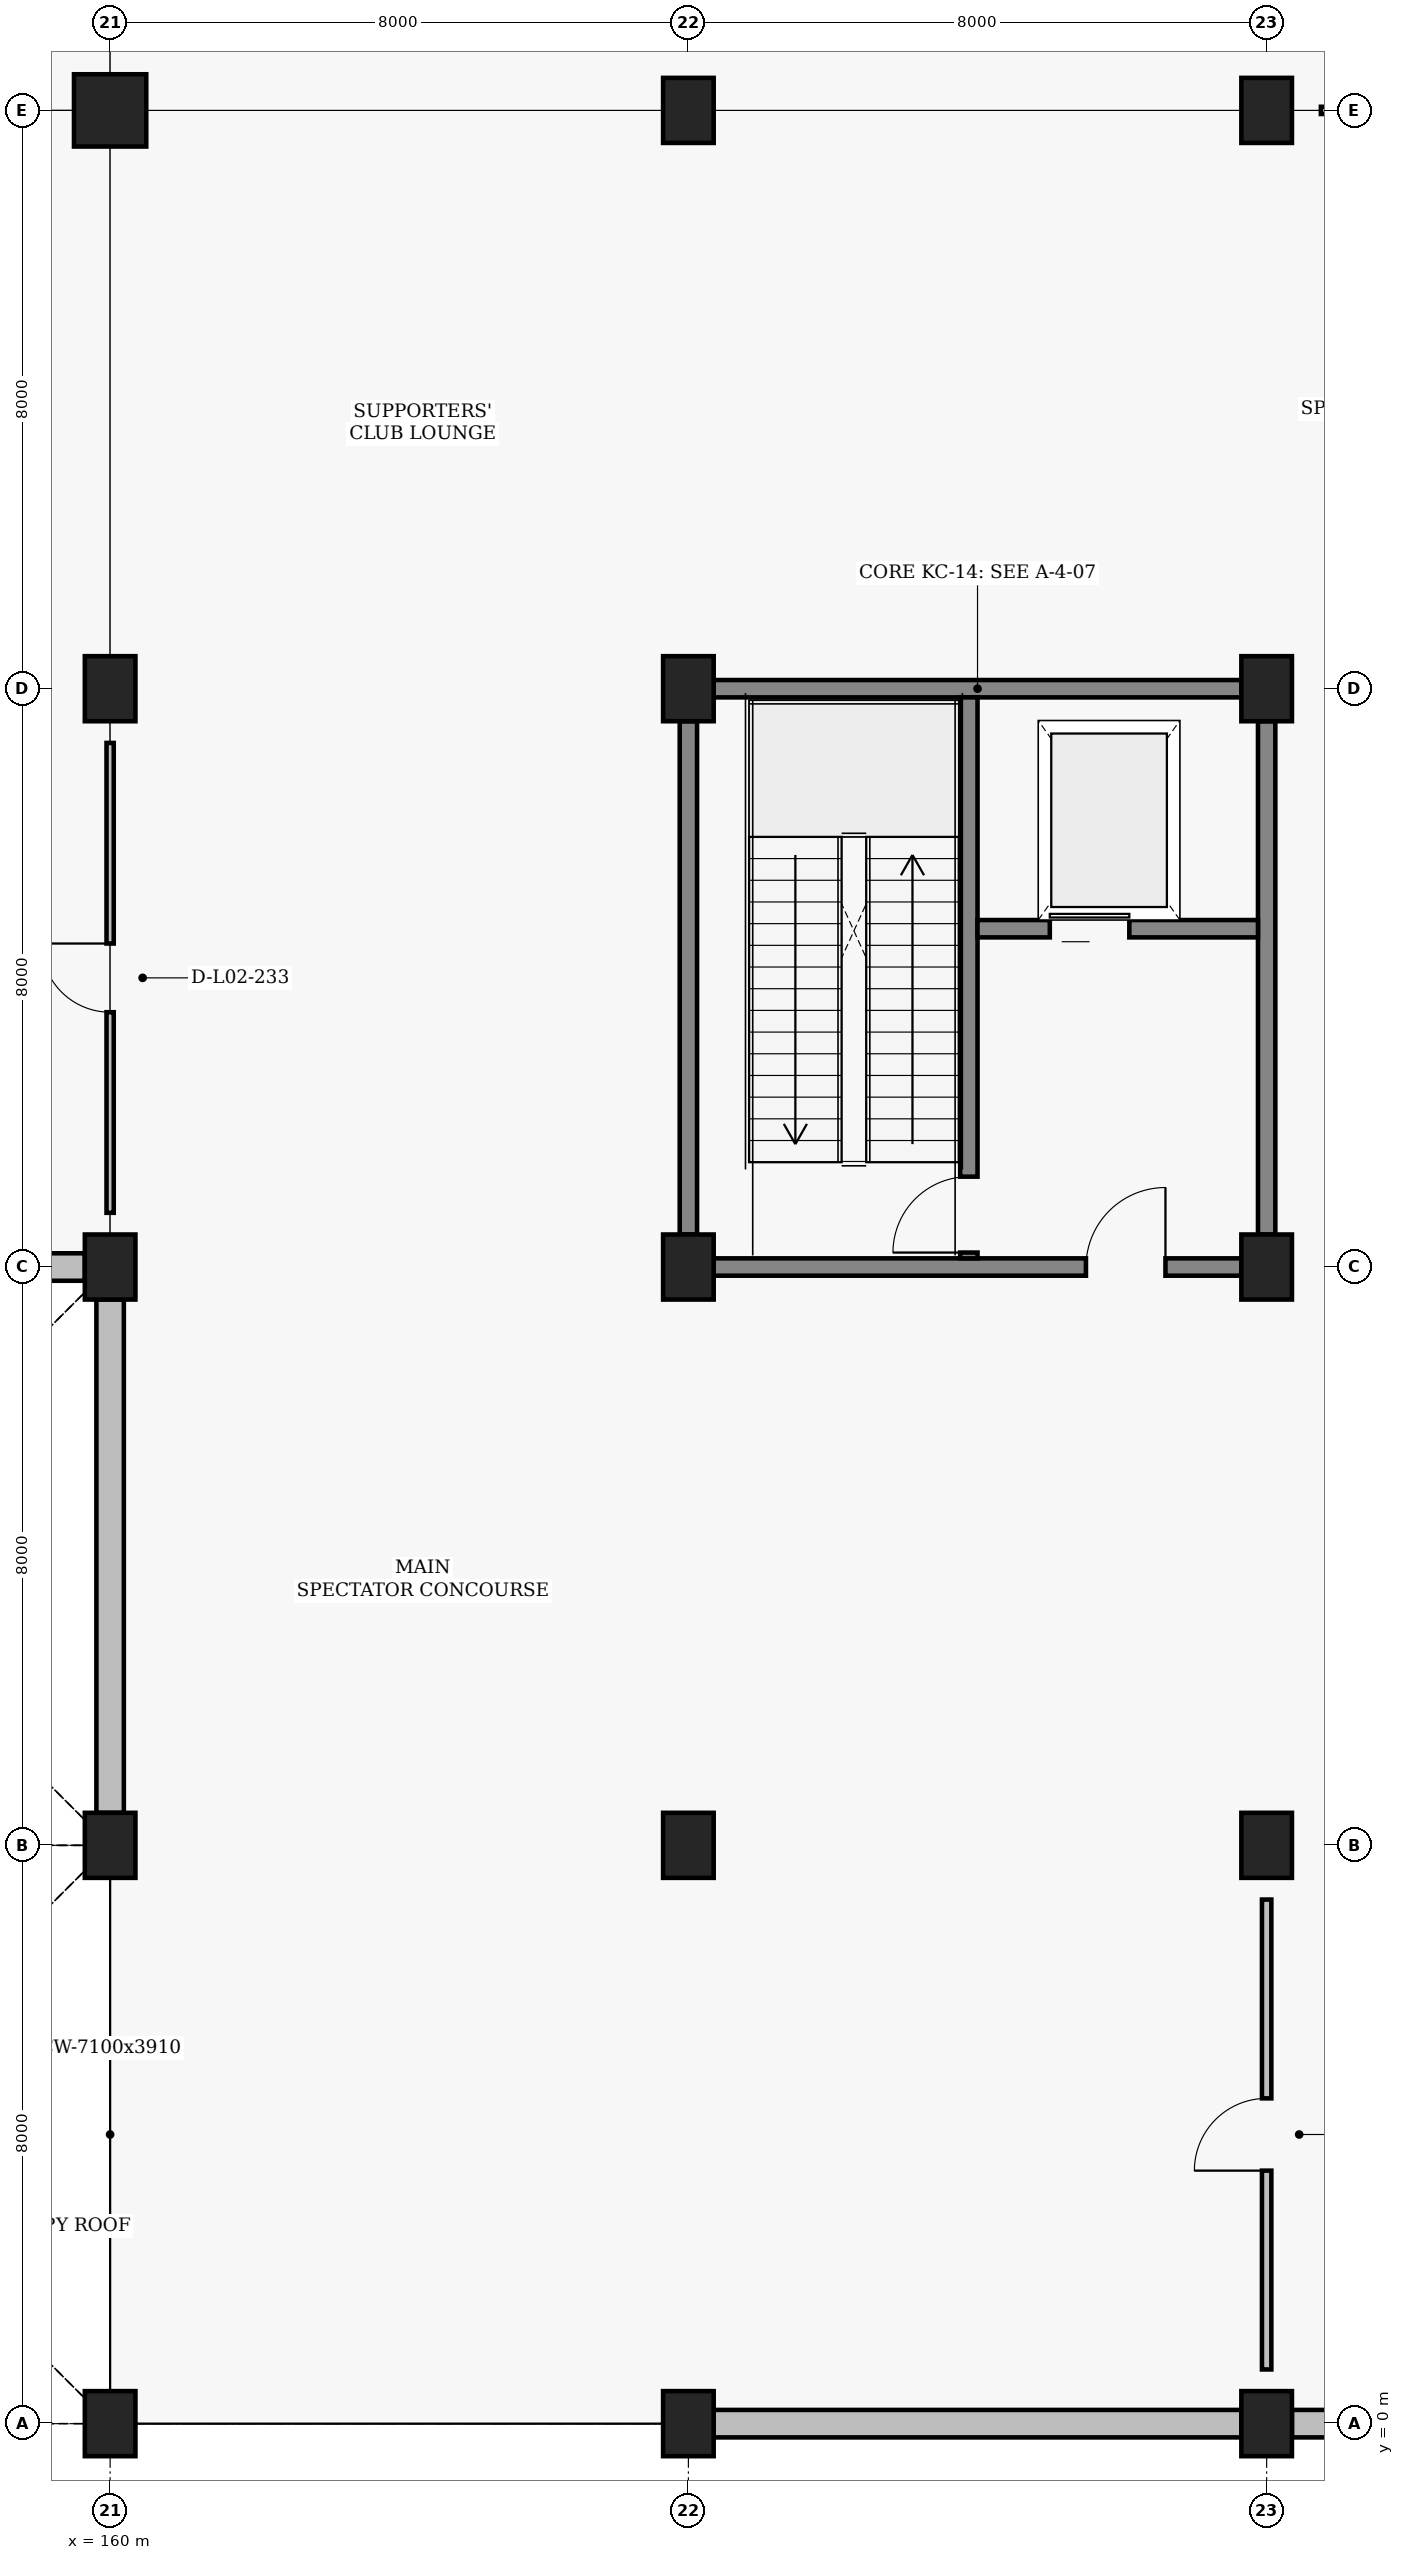
"""IFC4 building model, lengths in metres.
Left out: names, types, materials, properties, quantities, classifications, styles, units other than length and angle.
Written with IfcOpenShell. Run it as: python <this file> out.ifc"""

import sys

from ifc_helpers import new_model, si_unit, direction, frame, frame_2d, origin, origin_2d, place, context, subcontext, project, spatial, rectangle, extrude, element, fill, save


model = new_model("IFC4")
c1 = context("Model", 3, precision=1e-05, world=origin(), true_north=direction((0.0, 1.0)))
c2 = subcontext(c1, "Body", "Model", "MODEL_VIEW")
j1 = project(units=[si_unit("LENGTHUNIT", "METRE"), si_unit("PLANEANGLEUNIT", "RADIAN")], contexts=[c1])
p1 = place(None, origin())
s1 = spatial("IfcSite", under=j1, at=p1, CompositionType="ELEMENT")
p2 = place(p1, origin())
s2 = spatial("IfcBuilding", under=s1, at=p2, CompositionType="ELEMENT")
p3 = place(p2, frame((0.0, 0.0, 4.8)))
s3 = spatial("IfcBuildingStorey", under=s2, at=p3, CompositionType="ELEMENT", Elevation=4.8)
for number, where, z_axis, x_axis in (
    (1, (160.0, 0.0, 0.0), (0.0, 0.0, 1.0), (1.0, 0.0, 0.0)),
    (2, (160.0, 8.0, 0.0), (0.0, 0.0, 1.0), (1.0, 0.0, 0.0)),
    (3, (160.0, 16.0, 0.0), (0.0, 0.0, 1.0), (1.0, 0.0, 0.0)),
    (4, (160.0, 24.0, 0.0), (0.0, 0.0, 1.0), (1.0, 0.0, 0.0)),
):
    element("IfcColumn", number, at=place(p3, frame(where, z_axis=z_axis, x_axis=x_axis)), inside=s3, PredefinedType="COLUMN", context=c2, shape_type="SweptSolid", body=[
        extrude(rectangle(XDim=0.7, YDim=0.9, at=origin_2d()), origin(), (0.0, 0.0, 1.0), 4.8),
    ])
p4 = place(p3, frame((160.0, 32.0, 0.0), z_axis=(0.0, 0.0, 1.0), x_axis=(1.0, 0.0, 0.0)))
e5 = element("IfcColumn", 5, at=p4, inside=s3, PredefinedType="COLUMN", context=c2, shape_type="SweptSolid", body=[
    extrude(rectangle(XDim=1.0, YDim=1.0, at=origin_2d()), origin(), (0.0, 0.0, 1.0), 4.8),
])
for number, where, z_axis, x_axis in (
    (6, (168.0, 0.0, 0.0), (0.0, 0.0, 1.0), (1.0, 0.0, 0.0)),
    (7, (168.0, 8.0, 0.0), (0.0, 0.0, 1.0), (1.0, 0.0, 0.0)),
    (8, (168.0, 16.0, 0.0), (0.0, 0.0, 1.0), (1.0, 0.0, 0.0)),
    (9, (168.0, 24.0, 0.0), (0.0, 0.0, 1.0), (1.0, 0.0, 0.0)),
    (10, (168.0, 32.0, 0.0), (0.0, 0.0, 1.0), (1.0, 0.0, 0.0)),
    (11, (176.0, 0.0, 0.0), (0.0, 0.0, 1.0), (1.0, 0.0, 0.0)),
    (12, (176.0, 8.0, 0.0), (0.0, 0.0, 1.0), (1.0, 0.0, 0.0)),
    (13, (176.0, 16.0, 0.0), (0.0, 0.0, 1.0), (1.0, 0.0, 0.0)),
    (14, (176.0, 24.0, 0.0), (0.0, 0.0, 1.0), (1.0, 0.0, 0.0)),
    (15, (176.0, 32.0, 0.0), (0.0, 0.0, 1.0), (1.0, 0.0, 0.0)),
):
    element("IfcColumn", number, at=place(p3, frame(where, z_axis=z_axis, x_axis=x_axis)), inside=s3, PredefinedType="COLUMN", context=c2, shape_type="SweptSolid", body=[
        extrude(rectangle(XDim=0.7, YDim=0.9, at=origin_2d()), origin(), (0.0, 0.0, 1.0), 4.8),
    ])
p5 = place(p3, frame((152.35, 16.0, 0.0), z_axis=(0.0, 0.0, 1.0), x_axis=(1.0, 0.0, 0.0)))
e16 = element("IfcWall", 16, at=p5, inside=s3, PredefinedType="SOLIDWALL", context=c2, shape_type="SweptSolid", body=[
    extrude(rectangle(XDim=7.3, YDim=0.38, at=frame_2d((3.65, 0.0))), origin(), (0.0, 0.0, 1.0), 3.91),
])
p6 = place(p3, frame((160.0, 8.45, 0.0), z_axis=(0.0, 0.0, 1.0), x_axis=(0.0, 1.0, 0.0)))
e17 = element("IfcWall", 17, at=p6, inside=s3, PredefinedType="SOLIDWALL", context=c2, shape_type="SweptSolid", body=[
    extrude(rectangle(XDim=7.1, YDim=0.38, at=frame_2d((3.55, 0.0))), origin(), (0.0, 0.0, 1.0), 3.91),
])
p7 = place(p3, frame((168.35, 0.0, 0.0), z_axis=(0.0, 0.0, 1.0), x_axis=(1.0, 0.0, 0.0)))
e18 = element("IfcWall", 18, at=p7, inside=s3, PredefinedType="SOLIDWALL", context=c2, shape_type="SweptSolid", body=[
    extrude(rectangle(XDim=7.3, YDim=0.38, at=frame_2d((3.65, 0.0))), origin(), (0.0, 0.0, 1.0), 3.91),
])
p8 = place(p3, frame((176.35, 0.0, 0.0), z_axis=(0.0, 0.0, 1.0), x_axis=(1.0, 0.0, 0.0)))
e19 = element("IfcWall", 19, at=p8, inside=s3, PredefinedType="SOLIDWALL", context=c2, shape_type="SweptSolid", body=[
    extrude(rectangle(XDim=7.3, YDim=0.38, at=frame_2d((3.65, 0.0))), origin(), (0.0, 0.0, 1.0), 3.91),
])
p9 = place(p8, frame((2.45, 0.0, 0.95)))
e20 = element("IfcOpeningElement", 20, at=p9, cuts=e19, PredefinedType="OPENING", context=c2, shape_type="SweptSolid", body=[
    extrude(rectangle(XDim=2.4, YDim=2.0, at=frame_2d((1.2, 1.0))), frame((0.0, 0.2, 0.0), z_axis=(0.0, -1.0, 0.0), x_axis=(1.0, 0.0, 0.0)), (0.0, 0.0, 1.0), 0.4),
])
p10 = place(p3, frame((168.35, 16.0, 0.0), z_axis=(0.0, 0.0, 1.0), x_axis=(1.0, 0.0, 0.0)))
e21 = element("IfcWall", 21, at=p10, inside=s3, PredefinedType="SHEAR", context=c2, shape_type="SweptSolid", body=[
    extrude(rectangle(XDim=7.3, YDim=0.24, at=frame_2d((3.65, 0.0))), origin(), (0.0, 0.0, 1.0), 3.61),
])
p11 = place(p10, frame((5.15, 0.0, 0.0)))
e22 = element("IfcOpeningElement", 22, at=p11, cuts=e21, PredefinedType="OPENING", context=c2, shape_type="SweptSolid", body=[
    extrude(rectangle(XDim=1.1, YDim=2.2, at=frame_2d((0.55, 1.1))), frame((0.0, 0.13, 0.0), z_axis=(0.0, -1.0, 0.0), x_axis=(1.0, 0.0, 0.0)), (0.0, 0.0, 1.0), 0.26),
])
p12 = place(p3, frame((168.35, 24.0, 0.0), z_axis=(0.0, 0.0, 1.0), x_axis=(1.0, 0.0, 0.0)))
e23 = element("IfcWall", 23, at=p12, inside=s3, PredefinedType="SHEAR", context=c2, shape_type="SweptSolid", body=[
    extrude(rectangle(XDim=7.3, YDim=0.24, at=frame_2d((3.65, 0.0))), origin(), (0.0, 0.0, 1.0), 3.91),
])
p13 = place(p3, frame((168.0, 16.45, 0.0), z_axis=(0.0, 0.0, 1.0), x_axis=(0.0, 1.0, 0.0)))
e24 = element("IfcWall", 24, at=p13, inside=s3, PredefinedType="SHEAR", context=c2, shape_type="SweptSolid", body=[
    extrude(rectangle(XDim=7.1, YDim=0.24, at=frame_2d((3.55, 0.0))), origin(), (0.0, 0.0, 1.0), 3.91),
])
p14 = place(p3, frame((176.0, 16.45, 0.0), z_axis=(0.0, 0.0, 1.0), x_axis=(0.0, 1.0, 0.0)))
e25 = element("IfcWall", 25, at=p14, inside=s3, PredefinedType="SHEAR", context=c2, shape_type="SweptSolid", body=[
    extrude(rectangle(XDim=7.1, YDim=0.24, at=frame_2d((3.55, 0.0))), origin(), (0.0, 0.0, 1.0), 3.61),
])
p15 = place(p3, frame((171.88, 16.12, 0.0), z_axis=(0.0, 0.0, 1.0), x_axis=(0.0, 1.0, 0.0)))
e26 = element("IfcWall", 26, at=p15, inside=s3, PredefinedType="SHEAR", context=c2, shape_type="SweptSolid", body=[
    extrude(rectangle(XDim=7.76, YDim=0.24, at=frame_2d((3.88, 0.0))), origin(), (0.0, 0.0, 1.0), 4.01),
])
p16 = place(p15, frame((0.08, 0.0, 0.0)))
e27 = element("IfcOpeningElement", 27, at=p16, cuts=e26, PredefinedType="OPENING", context=c2, shape_type="SweptSolid", body=[
    extrude(rectangle(XDim=1.05, YDim=2.15, at=frame_2d((0.525, 1.075))), frame((0.0, 0.13, 0.0), z_axis=(0.0, -1.0, 0.0), x_axis=(1.0, 0.0, 0.0)), (0.0, 0.0, 1.0), 0.26),
])
p17 = place(p3, frame((172.0, 20.68, 0.0), z_axis=(0.0, 0.0, 1.0), x_axis=(1.0, 0.0, 0.0)))
e28 = element("IfcWall", 28, at=p17, inside=s3, PredefinedType="SHEAR", context=c2, shape_type="SweptSolid", body=[
    extrude(rectangle(XDim=3.88, YDim=0.24, at=frame_2d((1.94, 0.0))), origin(), (0.0, 0.0, 1.0), 3.91),
])
p18 = place(p17, frame((1.0, 0.0, 0.0)))
e29 = element("IfcOpeningElement", 29, at=p18, cuts=e28, PredefinedType="OPENING", context=c2, shape_type="SweptSolid", body=[
    extrude(rectangle(XDim=1.1, YDim=2.15, at=frame_2d((0.55, 1.075))), frame((0.0, 0.13, 0.0), z_axis=(0.0, -1.0, 0.0), x_axis=(1.0, 0.0, 0.0)), (0.0, 0.0, 1.0), 0.26),
])
p19 = place(p3, frame((160.0, 16.75, 0.0), z_axis=(0.0, 0.0, 1.0), x_axis=(0.0, 1.0, 0.0)))
e30 = element("IfcWall", 30, at=p19, inside=s3, PredefinedType="PARTITIONING", context=c2, shape_type="SweptSolid", body=[
    extrude(rectangle(XDim=6.5, YDim=0.1, at=frame_2d((3.25, 0.0))), origin(), (0.0, 0.0, 1.0), 3.91),
])
p20 = place(p19, frame((2.775, 0.0, 0.0)))
e31 = element("IfcOpeningElement", 31, at=p20, cuts=e30, PredefinedType="OPENING", context=c2, shape_type="SweptSolid", body=[
    extrude(rectangle(XDim=0.95, YDim=2.1, at=frame_2d((0.475, 1.05))), frame((0.0, 0.06, 0.0), z_axis=(0.0, -1.0, 0.0), x_axis=(1.0, 0.0, 0.0)), (0.0, 0.0, 1.0), 0.12),
])
p21 = place(p3, frame((176.0, 0.75, 0.0), z_axis=(0.0, 0.0, 1.0), x_axis=(0.0, 1.0, 0.0)))
e32 = element("IfcWall", 32, at=p21, inside=s3, PredefinedType="PARTITIONING", context=c2, shape_type="SweptSolid", body=[
    extrude(rectangle(XDim=6.5, YDim=0.13, at=frame_2d((3.25, 0.0))), origin(), (0.0, 0.0, 1.0), 3.91),
])
p22 = place(p21, frame((2.75, 0.0, 0.0)))
e33 = element("IfcOpeningElement", 33, at=p22, cuts=e32, PredefinedType="OPENING", context=c2, shape_type="SweptSolid", body=[
    extrude(rectangle(XDim=1.0, YDim=2.1, at=frame_2d((0.5, 1.05))), frame((0.0, 0.075, 0.0), z_axis=(0.0, -1.0, 0.0), x_axis=(1.0, 0.0, 0.0)), (0.0, 0.0, 1.0), 0.15),
])
p23 = place(p3, frame((176.75, 32.0, 0.0), z_axis=(0.0, 0.0, 1.0), x_axis=(1.0, 0.0, 0.0)))
e34 = element("IfcWall", 34, at=p23, inside=s3, PredefinedType="PARTITIONING", context=c2, shape_type="SweptSolid", body=[
    extrude(rectangle(XDim=6.5, YDim=0.1, at=frame_2d((3.25, 0.0))), origin(), (0.0, 0.0, 1.0), 3.91),
])
p24 = place(p23, frame((2.775, 0.0, 0.0)))
e35 = element("IfcOpeningElement", 35, at=p24, cuts=e34, PredefinedType="OPENING", context=c2, shape_type="SweptSolid", body=[
    extrude(rectangle(XDim=0.95, YDim=2.1, at=frame_2d((0.475, 1.05))), frame((0.0, 0.06, 0.0), z_axis=(0.0, -1.0, 0.0), x_axis=(1.0, 0.0, 0.0)), (0.0, 0.0, 1.0), 0.12),
])
p25 = place(p11, origin())
e36 = element("IfcDoor", 36, at=p25, inside=s3, OperationType="SINGLE_SWING_RIGHT", PredefinedType="DOOR", context=c2, shape_type="SweptSolid", body=[
    extrude(rectangle(XDim=1.1, YDim=2.2, at=frame_2d((0.55, 1.1))), frame((0.0, 0.025, 0.0), z_axis=(0.0, -1.0, 0.0), x_axis=(1.0, 0.0, 0.0)), (0.0, 0.0, 1.0), 0.05),
])
fill(e22, e36)
p26 = place(p16, origin())
e37 = element("IfcDoor", 37, at=p26, inside=s3, OperationType="SINGLE_SWING_LEFT", PredefinedType="DOOR", context=c2, shape_type="SweptSolid", body=[
    extrude(rectangle(XDim=1.05, YDim=2.15, at=frame_2d((0.525, 1.075))), frame((0.0, 0.025, 0.0), z_axis=(0.0, -1.0, 0.0), x_axis=(1.0, 0.0, 0.0)), (0.0, 0.0, 1.0), 0.05),
])
fill(e27, e37)
p27 = place(p18, origin())
e38 = element("IfcDoor", 38, at=p27, inside=s3, OperationType="SLIDING_TO_LEFT", PredefinedType="DOOR", context=c2, shape_type="SweptSolid", body=[
    extrude(rectangle(XDim=1.1, YDim=2.15, at=frame_2d((0.55, 1.075))), frame((0.0, 0.025, 0.0), z_axis=(0.0, -1.0, 0.0), x_axis=(1.0, 0.0, 0.0)), (0.0, 0.0, 1.0), 0.05),
])
fill(e29, e38)
p28 = place(p20, origin())
e39 = element("IfcDoor", 39, at=p28, inside=s3, OperationType="SINGLE_SWING_RIGHT", PredefinedType="DOOR", context=c2, shape_type="SweptSolid", body=[
    extrude(rectangle(XDim=0.95, YDim=2.1, at=frame_2d((0.475, 1.05))), frame((0.0, 0.025, 0.0), z_axis=(0.0, -1.0, 0.0), x_axis=(1.0, 0.0, 0.0)), (0.0, 0.0, 1.0), 0.05),
])
fill(e31, e39)
p29 = place(p22, origin())
e40 = element("IfcDoor", 40, at=p29, inside=s3, OperationType="SINGLE_SWING_LEFT", PredefinedType="DOOR", context=c2, shape_type="SweptSolid", body=[
    extrude(rectangle(XDim=1.0, YDim=2.1, at=frame_2d((0.5, 1.05))), frame((0.0, 0.025, 0.0), z_axis=(0.0, -1.0, 0.0), x_axis=(1.0, 0.0, 0.0)), (0.0, 0.0, 1.0), 0.05),
])
fill(e33, e40)
save(model, sys.argv[1])
